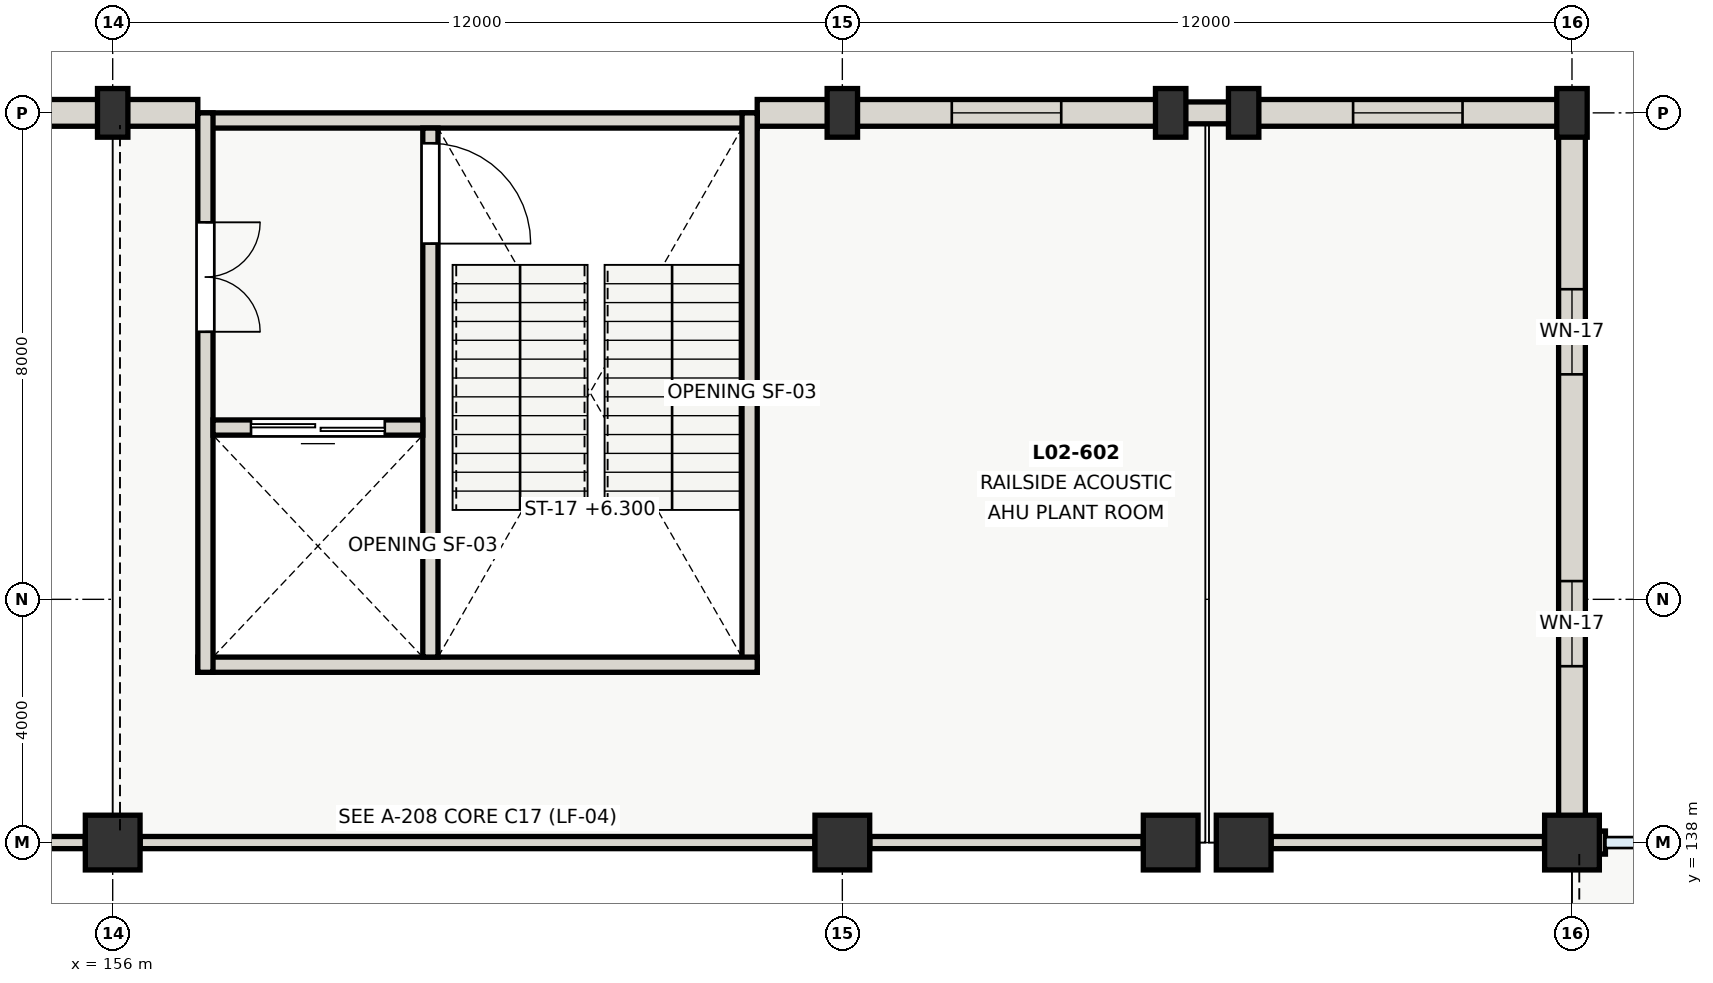
"""IFC4 building model, lengths in metres.
Left out: names, types, materials, properties, quantities, classifications, styles, units other than length and angle.
Written with IfcOpenShell. Run it as: python <this file> out.ifc"""

import sys

from ifc_helpers import new_model, si_unit, direction, frame, frame_2d, origin, origin_2d, place, context, subcontext, project, spatial, rectangle, extrude, element, fill, save


model = new_model("IFC4")
c1 = context("Model", 3, precision=1e-05, world=origin(), true_north=direction((0.0, 1.0)))
c2 = subcontext(c1, "Body", "Model", "MODEL_VIEW")
j1 = project(units=[si_unit("LENGTHUNIT", "METRE"), si_unit("PLANEANGLEUNIT", "RADIAN")], contexts=[c1])
p1 = place(None, origin())
s1 = spatial("IfcSite", under=j1, at=p1, CompositionType="ELEMENT")
p2 = place(p1, origin())
s2 = spatial("IfcBuilding", under=s1, at=p2, CompositionType="ELEMENT")
p3 = place(p2, frame((0.0, 0.0, 4.2)))
s3 = spatial("IfcBuildingStorey", under=s2, at=p3, CompositionType="ELEMENT", Elevation=4.2)
for number, where, z_axis, x_axis in (
    (1, (156.0, 138.0, 0.0), (0.0, 0.0, 1.0), (1.0, 0.0, 0.0)),
    (2, (168.0, 138.0, 0.0), (0.0, 0.0, 1.0), (1.0, 0.0, 0.0)),
    (3, (173.4, 138.0, 0.0), (0.0, 0.0, 1.0), (1.0, 0.0, 0.0)),
    (4, (174.6, 138.0, 0.0), (0.0, 0.0, 1.0), (1.0, 0.0, 0.0)),
    (5, (180.0, 138.0, 0.0), (0.0, 0.0, 1.0), (1.0, 0.0, 0.0)),
):
    element("IfcColumn", number, at=place(p3, frame(where, z_axis=z_axis, x_axis=x_axis)), inside=s3, PredefinedType="COLUMN", context=c2, shape_type="SweptSolid", body=[
        extrude(rectangle(XDim=0.9, YDim=0.9, at=origin_2d()), origin(), (0.0, 0.0, 1.0), 4.2),
    ])
for number, where, z_axis, x_axis in (
    (6, (156.0, 150.0, 0.0), (0.0, 0.0, 1.0), (1.0, 0.0, 0.0)),
    (7, (168.0, 150.0, 0.0), (0.0, 0.0, 1.0), (1.0, 0.0, 0.0)),
    (8, (173.4, 150.0, 0.0), (0.0, 0.0, 1.0), (1.0, 0.0, 0.0)),
    (9, (174.6, 150.0, 0.0), (0.0, 0.0, 1.0), (1.0, 0.0, 0.0)),
    (10, (180.0, 150.0, 0.0), (0.0, 0.0, 1.0), (1.0, 0.0, 0.0)),
):
    element("IfcColumn", number, at=place(p3, frame(where, z_axis=z_axis, x_axis=x_axis)), inside=s3, PredefinedType="COLUMN", context=c2, shape_type="SweptSolid", body=[
        extrude(rectangle(XDim=0.5, YDim=0.8, at=origin_2d()), origin(), (0.0, 0.0, 1.0), 4.2),
    ])
p4 = place(p3, frame((180.222, 138.0, 0.0), z_axis=(0.0, 0.0, 1.0), x_axis=(1.0, 0.0, 0.0)))
e11 = element("IfcWall", 11, at=p4, inside=s3, PredefinedType="SOLIDWALL", context=c2, shape_type="SweptSolid", body=[
    extrude(rectangle(XDim=0.328, YDim=0.38, at=frame_2d((0.164, 0.0))), origin(), (0.0, 0.0, 1.0), 3.53),
])
p5 = place(p3, frame((144.0, 150.0, 0.0), z_axis=(0.0, 0.0, 1.0), x_axis=(1.0, 0.0, 0.0)))
e12 = element("IfcWall", 12, at=p5, inside=s3, PredefinedType="SHEAR", context=c2, shape_type="SweptSolid", body=[
    extrude(rectangle(XDim=12.0, YDim=0.44, at=frame_2d((6.0, 0.0))), origin(), (0.0, 0.0, 1.0), 4.2),
])
p6 = place(p5, frame((2.7, 0.0, 1.6)))
e13 = element("IfcOpeningElement", 13, at=p6, cuts=e12, PredefinedType="OPENING", context=c2, shape_type="SweptSolid", body=[
    extrude(rectangle(XDim=1.8, YDim=1.05, at=frame_2d((0.9, 0.525))), frame((0.0, 0.23, 0.0), z_axis=(0.0, -1.0, 0.0), x_axis=(1.0, 0.0, 0.0)), (0.0, 0.0, 1.0), 0.46),
])
p7 = place(p5, frame((7.5, 0.0, 1.6)))
e14 = element("IfcOpeningElement", 14, at=p7, cuts=e12, PredefinedType="OPENING", context=c2, shape_type="SweptSolid", body=[
    extrude(rectangle(XDim=1.8, YDim=1.05, at=frame_2d((0.9, 0.525))), frame((0.0, 0.23, 0.0), z_axis=(0.0, -1.0, 0.0), x_axis=(1.0, 0.0, 0.0)), (0.0, 0.0, 1.0), 0.46),
])
for number, where, z_axis, x_axis in (
    (15, (156.0, 150.0, 0.0), (0.0, 0.0, 1.0), (1.0, 0.0, 0.0)),
    (16, (166.6, 150.0, 0.0), (0.0, 0.0, 1.0), (1.0, 0.0, 0.0)),
):
    element("IfcWall", number, at=place(p3, frame(where, z_axis=z_axis, x_axis=x_axis)), inside=s3, PredefinedType="SHEAR", context=c2, shape_type="SweptSolid", body=[
        extrude(rectangle(XDim=1.4, YDim=0.44, at=frame_2d((0.7, 0.0))), origin(), (0.0, 0.0, 1.0), 4.2),
    ])
p8 = place(p3, frame((168.0, 150.0, 0.0), z_axis=(0.0, 0.0, 1.0), x_axis=(1.0, 0.0, 0.0)))
e17 = element("IfcWall", 17, at=p8, inside=s3, PredefinedType="SHEAR", context=c2, shape_type="SweptSolid", body=[
    extrude(rectangle(XDim=5.4, YDim=0.44, at=frame_2d((2.7, 0.0))), origin(), (0.0, 0.0, 1.0), 4.2),
])
p9 = place(p8, frame((1.8, 0.0, 1.6)))
e18 = element("IfcOpeningElement", 18, at=p9, cuts=e17, PredefinedType="OPENING", context=c2, shape_type="SweptSolid", body=[
    extrude(rectangle(XDim=1.8, YDim=1.05, at=frame_2d((0.9, 0.525))), frame((0.0, 0.23, 0.0), z_axis=(0.0, -1.0, 0.0), x_axis=(1.0, 0.0, 0.0)), (0.0, 0.0, 1.0), 0.46),
])
p10 = place(p3, frame((174.6, 150.0, 0.0), z_axis=(0.0, 0.0, 1.0), x_axis=(1.0, 0.0, 0.0)))
e19 = element("IfcWall", 19, at=p10, inside=s3, PredefinedType="SHEAR", context=c2, shape_type="SweptSolid", body=[
    extrude(rectangle(XDim=5.4, YDim=0.44, at=frame_2d((2.7, 0.0))), origin(), (0.0, 0.0, 1.0), 4.2),
])
p11 = place(p10, frame((1.8, 0.0, 1.6)))
e20 = element("IfcOpeningElement", 20, at=p11, cuts=e19, PredefinedType="OPENING", context=c2, shape_type="SweptSolid", body=[
    extrude(rectangle(XDim=1.8, YDim=1.05, at=frame_2d((0.9, 0.525))), frame((0.0, 0.23, 0.0), z_axis=(0.0, -1.0, 0.0), x_axis=(1.0, 0.0, 0.0)), (0.0, 0.0, 1.0), 0.46),
])
p12 = place(p3, frame((180.0, 150.0, 0.0), z_axis=(0.0, 0.0, 1.0), x_axis=(0.0, -1.0, 0.0)))
e21 = element("IfcWall", 21, at=p12, inside=s3, PredefinedType="SHEAR", context=c2, shape_type="SweptSolid", body=[
    extrude(rectangle(XDim=12.0, YDim=0.44, at=frame_2d((6.0, 0.0))), origin(), (0.0, 0.0, 1.0), 4.2),
])
p13 = place(p12, frame((2.9, 0.0, 1.5)))
e22 = element("IfcOpeningElement", 22, at=p13, cuts=e21, PredefinedType="OPENING", context=c2, shape_type="SweptSolid", body=[
    extrude(rectangle(XDim=1.4, YDim=0.95, at=frame_2d((0.7, 0.475))), frame((0.0, 0.23, 0.0), z_axis=(0.0, -1.0, 0.0), x_axis=(1.0, 0.0, 0.0)), (0.0, 0.0, 1.0), 0.46),
])
p14 = place(p12, frame((7.7, 0.0, 1.5)))
e23 = element("IfcOpeningElement", 23, at=p14, cuts=e21, PredefinedType="OPENING", context=c2, shape_type="SweptSolid", body=[
    extrude(rectangle(XDim=1.4, YDim=0.95, at=frame_2d((0.7, 0.475))), frame((0.0, 0.23, 0.0), z_axis=(0.0, -1.0, 0.0), x_axis=(1.0, 0.0, 0.0)), (0.0, 0.0, 1.0), 0.46),
])
p15 = place(p3, frame((173.4, 150.0, 0.0), z_axis=(0.0, 0.0, 1.0), x_axis=(1.0, 0.0, 0.0)))
e24 = element("IfcWall", 24, at=p15, inside=s3, PredefinedType="SOLIDWALL", context=c2, shape_type="SweptSolid", body=[
    extrude(rectangle(XDim=1.2, YDim=0.36, at=frame_2d((0.6, 0.0))), origin(), (0.0, 0.0, 1.0), 4.2),
])
p16 = place(p3, frame((157.4, 149.875, 0.0), z_axis=(0.0, 0.0, 1.0), x_axis=(1.0, 0.0, 0.0)))
e25 = element("IfcWall", 25, at=p16, inside=s3, PredefinedType="SHEAR", context=c2, shape_type="SweptSolid", body=[
    extrude(rectangle(XDim=9.2, YDim=0.25, at=frame_2d((4.6, 0.0))), origin(), (0.0, 0.0, 1.0), 4.2),
])
p17 = place(p3, frame((166.475, 150.0, 0.0), z_axis=(0.0, 0.0, 1.0), x_axis=(0.0, -1.0, 0.0)))
e26 = element("IfcWall", 26, at=p17, inside=s3, PredefinedType="SHEAR", context=c2, shape_type="SweptSolid", body=[
    extrude(rectangle(XDim=9.2, YDim=0.25, at=frame_2d((4.6, 0.0))), origin(), (0.0, 0.0, 1.0), 4.2),
])
p18 = place(p3, frame((166.6, 140.925, 0.0), z_axis=(0.0, 0.0, 1.0), x_axis=(-1.0, 0.0, 0.0)))
e27 = element("IfcWall", 27, at=p18, inside=s3, PredefinedType="SHEAR", context=c2, shape_type="SweptSolid", body=[
    extrude(rectangle(XDim=9.2, YDim=0.25, at=frame_2d((4.6, 0.0))), origin(), (0.0, 0.0, 1.0), 4.2),
])
p19 = place(p3, frame((157.525, 150.0, 0.0), z_axis=(0.0, 0.0, 1.0), x_axis=(0.0, -1.0, 0.0)))
e28 = element("IfcWall", 28, at=p19, inside=s3, PredefinedType="SHEAR", context=c2, shape_type="SweptSolid", body=[
    extrude(rectangle(XDim=9.2, YDim=0.25, at=frame_2d((4.6, 0.0))), origin(), (0.0, 0.0, 1.0), 4.2),
])
p20 = place(p19, frame((1.8, 0.0, 0.0)))
e29 = element("IfcOpeningElement", 29, at=p20, cuts=e28, PredefinedType="OPENING", context=c2, shape_type="SweptSolid", body=[
    extrude(rectangle(XDim=1.8, YDim=2.15, at=frame_2d((0.9, 1.075))), frame((0.0, 0.135, 0.0), z_axis=(0.0, -1.0, 0.0), x_axis=(1.0, 0.0, 0.0)), (0.0, 0.0, 1.0), 0.27),
])
p21 = place(p3, frame((161.225, 149.75, 0.0), z_axis=(0.0, 0.0, 1.0), x_axis=(0.0, -1.0, 0.0)))
e30 = element("IfcWall", 30, at=p21, inside=s3, PredefinedType="SHEAR", context=c2, shape_type="SweptSolid", body=[
    extrude(rectangle(XDim=8.7, YDim=0.25, at=frame_2d((4.35, 0.0))), origin(), (0.0, 0.0, 1.0), 4.2),
])
p22 = place(p21, frame((0.25, 0.0, 0.0)))
e31 = element("IfcOpeningElement", 31, at=p22, cuts=e30, PredefinedType="OPENING", context=c2, shape_type="SweptSolid", body=[
    extrude(rectangle(XDim=1.65, YDim=2.1, at=frame_2d((0.825, 1.05))), frame((0.0, 0.135, 0.0), z_axis=(0.0, -1.0, 0.0), x_axis=(1.0, 0.0, 0.0)), (0.0, 0.0, 1.0), 0.27),
])
p23 = place(p3, frame((161.1, 144.825, 0.0), z_axis=(0.0, 0.0, 1.0), x_axis=(-1.0, 0.0, 0.0)))
e32 = element("IfcWall", 32, at=p23, inside=s3, PredefinedType="SHEAR", context=c2, shape_type="SweptSolid", body=[
    extrude(rectangle(XDim=3.45, YDim=0.25, at=frame_2d((1.725, 0.0))), origin(), (0.0, 0.0, 1.0), 4.2),
])
p24 = place(p23, frame((0.625, 0.0, 0.0)))
e33 = element("IfcOpeningElement", 33, at=p24, cuts=e32, PredefinedType="OPENING", context=c2, shape_type="SweptSolid", body=[
    extrude(rectangle(XDim=2.2, YDim=2.35, at=frame_2d((1.1, 1.175))), frame((0.0, 0.135, 0.0), z_axis=(0.0, -1.0, 0.0), x_axis=(1.0, 0.0, 0.0)), (0.0, 0.0, 1.0), 0.27),
])
p25 = place(p2, origin())
s4 = spatial("IfcBuildingStorey", under=s2, at=p25, CompositionType="ELEMENT", Elevation=0.0)
for number, where, z_axis, x_axis in (
    (34, (126.05, 139.47, 0.0), (0.0, 0.0, 1.0), (1.0, 0.0, 0.0)),
    (35, (126.05, 148.53, 0.0), (0.0, 0.0, 1.0), (1.0, 0.0, 0.0)),
):
    element("IfcWall", number, at=place(p25, frame(where, z_axis=z_axis, x_axis=x_axis)), inside=s4, PredefinedType="SHEAR", context=c2, shape_type="SweptSolid", body=[
        extrude(rectangle(XDim=29.95, YDim=0.26, at=frame_2d((14.975, 0.0))), origin(), (0.0, 0.0, 1.0), 9.8),
    ])
p26 = place(p25, frame((156.0, 138.3, 0.0), z_axis=(0.0, 0.0, 1.0), x_axis=(0.0, 1.0, 0.0)))
e36 = element("IfcWall", 36, at=p26, inside=s4, PredefinedType="SHEAR", context=c2, shape_type="SweptSolid", body=[
    extrude(rectangle(XDim=11.4, YDim=0.26, at=frame_2d((5.7, 0.0))), origin(), (0.0, 0.0, 1.0), 8.05),
])
p27 = place(p26, frame((4.8, 0.0, 0.0)))
e37 = element("IfcOpeningElement", 37, at=p27, cuts=e36, PredefinedType="OPENING", context=c2, shape_type="SweptSolid", body=[
    extrude(rectangle(XDim=1.4, YDim=2.15, at=frame_2d((0.7, 1.075))), frame((0.0, 0.14, 0.0), z_axis=(0.0, -1.0, 0.0), x_axis=(1.0, 0.0, 0.0)), (0.0, 0.0, 1.0), 0.28),
])
for number, where, z_axis, x_axis in (
    (38, (144.452, 138.0, 0.0), (0.0, 0.0, 1.0), (1.0, 0.0, 0.0)),
    (39, (156.452, 138.0, 0.0), (0.0, 0.0, 1.0), (1.0, 0.0, 0.0)),
):
    element("IfcWall", number, at=place(p3, frame(where, z_axis=z_axis, x_axis=x_axis)), inside=s3, PredefinedType="PARTITIONING", context=c2, shape_type="SweptSolid", body=[
        extrude(rectangle(XDim=11.096, YDim=0.2, at=frame_2d((5.548, 0.0))), origin(), (0.0, 0.0, 1.0), 3.53),
    ])
for number, where, z_axis, x_axis in (
    (40, (168.452, 138.0, 0.0), (0.0, 0.0, 1.0), (1.0, 0.0, 0.0)),
    (41, (175.052, 138.0, 0.0), (0.0, 0.0, 1.0), (1.0, 0.0, 0.0)),
):
    element("IfcWall", number, at=place(p3, frame(where, z_axis=z_axis, x_axis=x_axis)), inside=s3, PredefinedType="PARTITIONING", context=c2, shape_type="SweptSolid", body=[
        extrude(rectangle(XDim=4.496, YDim=0.2, at=frame_2d((2.248, 0.0))), origin(), (0.0, 0.0, 1.0), 3.53),
    ])
p28 = place(p9, origin())
e42 = element("IfcWindow", 42, at=p28, inside=s3, PartitioningType="SINGLE_PANEL", PredefinedType="WINDOW", context=c2, shape_type="SweptSolid", body=[
    extrude(rectangle(XDim=1.8, YDim=1.05, at=frame_2d((0.9, 0.525))), frame((0.0, 0.03, 0.0), z_axis=(0.0, -1.0, 0.0), x_axis=(1.0, 0.0, 0.0)), (0.0, 0.0, 1.0), 0.06),
])
fill(e18, e42)
p29 = place(p11, origin())
e43 = element("IfcWindow", 43, at=p29, inside=s3, PartitioningType="SINGLE_PANEL", PredefinedType="WINDOW", context=c2, shape_type="SweptSolid", body=[
    extrude(rectangle(XDim=1.8, YDim=1.05, at=frame_2d((0.9, 0.525))), frame((0.0, 0.03, 0.0), z_axis=(0.0, -1.0, 0.0), x_axis=(1.0, 0.0, 0.0)), (0.0, 0.0, 1.0), 0.06),
])
fill(e20, e43)
p30 = place(p13, origin())
e44 = element("IfcWindow", 44, at=p30, inside=s3, PartitioningType="SINGLE_PANEL", PredefinedType="WINDOW", context=c2, shape_type="SweptSolid", body=[
    extrude(rectangle(XDim=1.4, YDim=0.95, at=frame_2d((0.7, 0.475))), frame((0.0, 0.03, 0.0), z_axis=(0.0, -1.0, 0.0), x_axis=(1.0, 0.0, 0.0)), (0.0, 0.0, 1.0), 0.06),
])
fill(e22, e44)
p31 = place(p14, origin())
e45 = element("IfcWindow", 45, at=p31, inside=s3, PartitioningType="SINGLE_PANEL", PredefinedType="WINDOW", context=c2, shape_type="SweptSolid", body=[
    extrude(rectangle(XDim=1.4, YDim=0.95, at=frame_2d((0.7, 0.475))), frame((0.0, 0.03, 0.0), z_axis=(0.0, -1.0, 0.0), x_axis=(1.0, 0.0, 0.0)), (0.0, 0.0, 1.0), 0.06),
])
fill(e23, e45)
p32 = place(p20, origin())
e46 = element("IfcDoor", 46, at=p32, inside=s3, OperationType="DOUBLE_DOOR_SINGLE_SWING", PredefinedType="DOOR", context=c2, shape_type="SweptSolid", body=[
    extrude(rectangle(XDim=1.8, YDim=2.15, at=frame_2d((0.9, 1.075))), frame((0.0, 0.025, 0.0), z_axis=(0.0, -1.0, 0.0), x_axis=(1.0, 0.0, 0.0)), (0.0, 0.0, 1.0), 0.05),
])
fill(e29, e46)
p33 = place(p22, origin())
e47 = element("IfcDoor", 47, at=p33, inside=s3, OperationType="SINGLE_SWING_RIGHT", PredefinedType="DOOR", context=c2, shape_type="SweptSolid", body=[
    extrude(rectangle(XDim=1.65, YDim=2.1, at=frame_2d((0.825, 1.05))), frame((0.0, 0.025, 0.0), z_axis=(0.0, -1.0, 0.0), x_axis=(1.0, 0.0, 0.0)), (0.0, 0.0, 1.0), 0.05),
])
fill(e31, e47)
p34 = place(p24, origin())
e48 = element("IfcDoor", 48, at=p34, inside=s3, OperationType="SLIDING_TO_LEFT", PredefinedType="DOOR", context=c2, shape_type="SweptSolid", body=[
    extrude(rectangle(XDim=2.2, YDim=2.35, at=frame_2d((1.1, 1.175))), frame((0.0, 0.025, 0.0), z_axis=(0.0, -1.0, 0.0), x_axis=(1.0, 0.0, 0.0)), (0.0, 0.0, 1.0), 0.05),
])
fill(e33, e48)
save(model, sys.argv[1])
